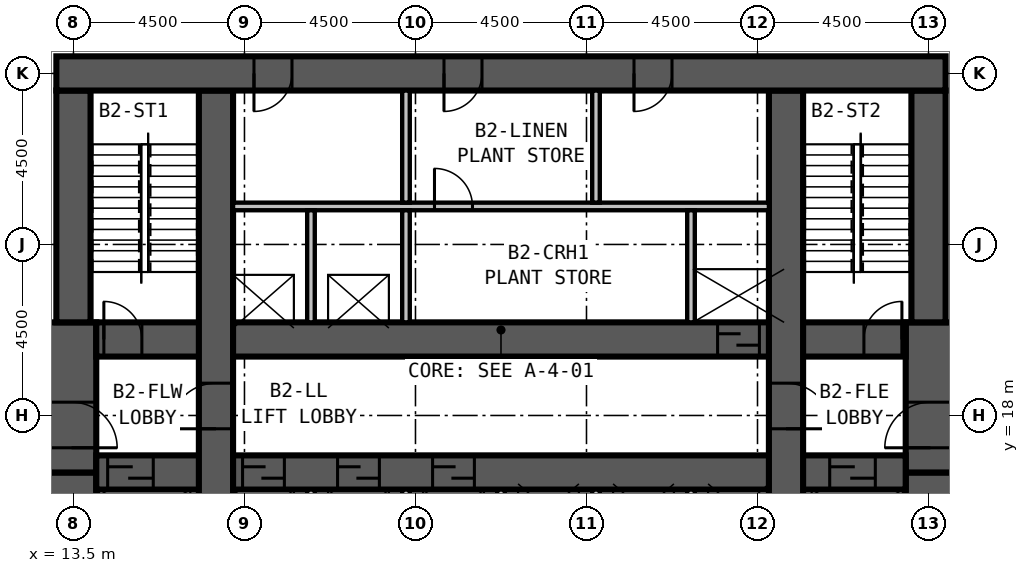
"""IFC4 building model, lengths in metres.
Left out: names, types, materials, properties, quantities, classifications, styles, units other than length and angle.
Written with IfcOpenShell. Run it as: python <this file> out.ifc"""

import sys

from ifc_helpers import new_model, si_unit, direction, frame, frame_2d, origin, place, context, subcontext, project, spatial, rectangle, extrude, element, fill, save


model = new_model("IFC4")
c1 = context("Model", 3, precision=1e-05, world=origin(), true_north=direction((0.0, 1.0)))
c2 = subcontext(c1, "Body", "Model", "MODEL_VIEW")
j1 = project(units=[si_unit("LENGTHUNIT", "METRE"), si_unit("PLANEANGLEUNIT", "RADIAN")], contexts=[c1])
p1 = place(None, origin())
s1 = spatial("IfcSite", under=j1, at=p1, CompositionType="ELEMENT")
p2 = place(p1, origin())
s2 = spatial("IfcBuilding", under=s1, at=p2, CompositionType="ELEMENT")
p3 = place(p2, frame((0.0, 0.0, -9.0)))
s3 = spatial("IfcBuildingStorey", under=s2, at=p3, CompositionType="ELEMENT", Elevation=-9.0)
p4 = place(p3, frame((36.45, 27.0, 0.0), z_axis=(0.0, 0.0, 1.0), x_axis=(-1.0, 0.0, 0.0)))
e1 = element("IfcWall", 1, at=p4, inside=s3, PredefinedType="SHEAR", context=c2, shape_type="SweptSolid", body=[
    extrude(rectangle(XDim=23.4, YDim=0.9, at=frame_2d((11.7, 0.0))), origin(), (0.0, 0.0, 1.0), 4.5),
])
p5 = place(p4, frame((17.2, 0.0, 0.0)))
e2 = element("IfcOpeningElement", 2, at=p5, cuts=e1, PredefinedType="OPENING", context=c2, shape_type="SweptSolid", body=[
    extrude(rectangle(XDim=1.0, YDim=2.1, at=frame_2d((0.5, 1.05))), frame((0.0, 0.46, 0.0), z_axis=(0.0, -1.0, 0.0), x_axis=(1.0, 0.0, 0.0)), (0.0, 0.0, 1.0), 0.92),
])
p6 = place(p4, frame((12.2, 0.0, 0.0)))
e3 = element("IfcOpeningElement", 3, at=p6, cuts=e1, PredefinedType="OPENING", context=c2, shape_type="SweptSolid", body=[
    extrude(rectangle(XDim=1.0, YDim=2.1, at=frame_2d((0.5, 1.05))), frame((0.0, 0.46, 0.0), z_axis=(0.0, -1.0, 0.0), x_axis=(1.0, 0.0, 0.0)), (0.0, 0.0, 1.0), 0.92),
])
p7 = place(p4, frame((7.2, 0.0, 0.0)))
e4 = element("IfcOpeningElement", 4, at=p7, cuts=e1, PredefinedType="OPENING", context=c2, shape_type="SweptSolid", body=[
    extrude(rectangle(XDim=1.0, YDim=2.1, at=frame_2d((0.5, 1.05))), frame((0.0, 0.46, 0.0), z_axis=(0.0, -1.0, 0.0), x_axis=(1.0, 0.0, 0.0)), (0.0, 0.0, 1.0), 0.92),
])
p8 = place(p3, frame((17.25, 13.95, 0.0), z_axis=(0.0, 0.0, 1.0), x_axis=(0.0, 1.0, 0.0)))
e5 = element("IfcWall", 5, at=p8, inside=s3, PredefinedType="SHEAR", context=c2, shape_type="SweptSolid", body=[
    extrude(rectangle(XDim=12.6, YDim=0.9, at=frame_2d((6.3, 0.0))), origin(), (0.0, 0.0, 1.0), 4.5),
])
p9 = place(p8, frame((3.7, 0.0, 0.0)))
e6 = element("IfcOpeningElement", 6, at=p9, cuts=e5, PredefinedType="OPENING", context=c2, shape_type="SweptSolid", body=[
    extrude(rectangle(XDim=1.2, YDim=2.1, at=frame_2d((0.6, 1.05))), frame((0.0, 0.46, 0.0), z_axis=(0.0, -1.0, 0.0), x_axis=(1.0, 0.0, 0.0)), (0.0, 0.0, 1.0), 0.92),
])
p10 = place(p3, frame((32.25, 13.95, 0.0), z_axis=(0.0, 0.0, 1.0), x_axis=(0.0, 1.0, 0.0)))
e7 = element("IfcWall", 7, at=p10, inside=s3, PredefinedType="SHEAR", context=c2, shape_type="SweptSolid", body=[
    extrude(rectangle(XDim=12.6, YDim=0.9, at=frame_2d((6.3, 0.0))), origin(), (0.0, 0.0, 1.0), 4.5),
])
p11 = place(p10, frame((4.9, 0.0, 0.0), z_axis=(0.0, 0.0, 1.0), x_axis=(-1.0, 0.0, 0.0)))
e8 = element("IfcOpeningElement", 8, at=p11, cuts=e7, PredefinedType="OPENING", context=c2, shape_type="SweptSolid", body=[
    extrude(rectangle(XDim=1.2, YDim=2.1, at=frame_2d((0.6, 1.05))), frame((0.0, 0.46, 0.0), z_axis=(0.0, -1.0, 0.0), x_axis=(1.0, 0.0, 0.0)), (0.0, 0.0, 1.0), 0.92),
])
p12 = place(p3, frame((14.1, 16.5, 0.0), z_axis=(0.0, 0.0, 1.0), x_axis=(1.0, 0.0, 0.0)))
e9 = element("IfcWall", 9, at=p12, inside=s3, PredefinedType="SHEAR", context=c2, shape_type="SweptSolid", body=[
    extrude(rectangle(XDim=21.3, YDim=0.9, at=frame_2d((10.65, 0.0))), origin(), (0.0, 0.0, 1.0), 4.5),
])
p13 = place(p12, frame((3.85, 0.0, 0.0)))
e10 = element("IfcOpeningElement", 10, at=p13, cuts=e9, PredefinedType="OPENING", context=c2, shape_type="SweptSolid", body=[
    extrude(rectangle(XDim=1.1, YDim=2.1, at=frame_2d((0.55, 1.05))), frame((0.0, 0.46, 0.0), z_axis=(0.0, -1.0, 0.0), x_axis=(1.0, 0.0, 0.0)), (0.0, 0.0, 1.0), 0.92),
])
p14 = place(p12, frame((6.35, 0.0, 0.0)))
e11 = element("IfcOpeningElement", 11, at=p14, cuts=e9, PredefinedType="OPENING", context=c2, shape_type="SweptSolid", body=[
    extrude(rectangle(XDim=1.1, YDim=2.1, at=frame_2d((0.55, 1.05))), frame((0.0, 0.46, 0.0), z_axis=(0.0, -1.0, 0.0), x_axis=(1.0, 0.0, 0.0)), (0.0, 0.0, 1.0), 0.92),
])
p15 = place(p12, frame((8.85, 0.0, 0.0)))
e12 = element("IfcOpeningElement", 12, at=p15, cuts=e9, PredefinedType="OPENING", context=c2, shape_type="SweptSolid", body=[
    extrude(rectangle(XDim=1.1, YDim=2.1, at=frame_2d((0.55, 1.05))), frame((0.0, 0.46, 0.0), z_axis=(0.0, -1.0, 0.0), x_axis=(1.0, 0.0, 0.0)), (0.0, 0.0, 1.0), 0.92),
])
p16 = place(p12, frame((0.3, 0.0, 0.0)))
e13 = element("IfcOpeningElement", 13, at=p16, cuts=e9, PredefinedType="OPENING", context=c2, shape_type="SweptSolid", body=[
    extrude(rectangle(XDim=1.2, YDim=2.1, at=frame_2d((0.6, 1.05))), frame((0.0, 0.46, 0.0), z_axis=(0.0, -1.0, 0.0), x_axis=(1.0, 0.0, 0.0)), (0.0, 0.0, 1.0), 0.92),
])
p17 = place(p12, frame((19.3, 0.0, 0.0)))
e14 = element("IfcOpeningElement", 14, at=p17, cuts=e9, PredefinedType="OPENING", context=c2, shape_type="SweptSolid", body=[
    extrude(rectangle(XDim=1.2, YDim=2.1, at=frame_2d((0.6, 1.05))), frame((0.0, 0.46, 0.0), z_axis=(0.0, -1.0, 0.0), x_axis=(1.0, 0.0, 0.0)), (0.0, 0.0, 1.0), 0.92),
])
p18 = place(p3, frame((14.1, 20.0, 0.0), z_axis=(0.0, 0.0, 1.0), x_axis=(1.0, 0.0, 0.0)))
e15 = element("IfcWall", 15, at=p18, inside=s3, PredefinedType="SHEAR", context=c2, shape_type="SweptSolid", body=[
    extrude(rectangle(XDim=21.3, YDim=0.9, at=frame_2d((10.65, 0.0))), origin(), (0.0, 0.0, 1.0), 4.5),
])
p19 = place(p18, frame((0.2, 0.0, 0.0)))
e16 = element("IfcOpeningElement", 16, at=p19, cuts=e15, PredefinedType="OPENING", context=c2, shape_type="SweptSolid", body=[
    extrude(rectangle(XDim=1.0, YDim=2.1, at=frame_2d((0.5, 1.05))), frame((0.0, 0.46, 0.0), z_axis=(0.0, -1.0, 0.0), x_axis=(1.0, 0.0, 0.0)), (0.0, 0.0, 1.0), 0.92),
])
p20 = place(p18, frame((20.2, 0.0, 0.0)))
e17 = element("IfcOpeningElement", 17, at=p20, cuts=e15, PredefinedType="OPENING", context=c2, shape_type="SweptSolid", body=[
    extrude(rectangle(XDim=1.0, YDim=2.1, at=frame_2d((0.5, 1.05))), frame((0.0, 0.46, 0.0), z_axis=(0.0, -1.0, 0.0), x_axis=(1.0, 0.0, 0.0)), (0.0, 0.0, 1.0), 0.92),
])
p21 = place(p18, frame((16.35, 0.0, 0.0)))
e18 = element("IfcOpeningElement", 18, at=p21, cuts=e15, PredefinedType="OPENING", context=c2, shape_type="SweptSolid", body=[
    extrude(rectangle(XDim=1.1, YDim=2.1, at=frame_2d((0.55, 1.05))), frame((0.0, 0.46, 0.0), z_axis=(0.0, -1.0, 0.0), x_axis=(1.0, 0.0, 0.0)), (0.0, 0.0, 1.0), 0.92),
])
p22 = place(p3, frame((13.5, 26.55, 0.0), z_axis=(0.0, 0.0, 1.0), x_axis=(0.0, -1.0, 0.0)))
e19 = element("IfcWall", 19, at=p22, inside=s3, PredefinedType="SHEAR", context=c2, shape_type="SweptSolid", body=[
    extrude(rectangle(XDim=6.1, YDim=0.9, at=frame_2d((3.05, 0.0))), origin(), (0.0, 0.0, 1.0), 4.5),
])
p23 = place(p3, frame((13.45, 20.45, 0.0), z_axis=(0.0, 0.0, 1.0), x_axis=(0.0, -1.0, 0.0)))
e20 = element("IfcWall", 20, at=p23, inside=s3, PredefinedType="SHEAR", context=c2, shape_type="SweptSolid", body=[
    extrude(rectangle(XDim=3.95, YDim=1.3, at=frame_2d((1.975, 0.0))), origin(), (0.0, 0.0, 1.0), 4.5),
])
p24 = place(p23, frame((2.1, 0.0, 0.0)))
e21 = element("IfcOpeningElement", 21, at=p24, cuts=e20, PredefinedType="OPENING", context=c2, shape_type="SweptSolid", body=[
    extrude(rectangle(XDim=1.2, YDim=2.1, at=frame_2d((0.6, 1.05))), frame((0.0, 0.66, 0.0), z_axis=(0.0, -1.0, 0.0), x_axis=(1.0, 0.0, 0.0)), (0.0, 0.0, 1.0), 1.32),
])
for number, where, z_axis, x_axis in (
    (22, (13.45, 16.5, 0.0), (0.0, 0.0, 1.0), (0.0, -1.0, 0.0)),
    (23, (36.05, 13.95, 0.0), (0.0, 0.0, 1.0), (0.0, 1.0, 0.0)),
):
    element("IfcWall", number, at=place(p3, frame(where, z_axis=z_axis, x_axis=x_axis)), inside=s3, PredefinedType="SHEAR", context=c2, shape_type="SweptSolid", body=[
        extrude(rectangle(XDim=2.55, YDim=1.3, at=frame_2d((1.275, 0.0))), origin(), (0.0, 0.0, 1.0), 4.5),
    ])
p25 = place(p3, frame((36.05, 16.5, 0.0), z_axis=(0.0, 0.0, 1.0), x_axis=(0.0, 1.0, 0.0)))
e24 = element("IfcWall", 24, at=p25, inside=s3, PredefinedType="SHEAR", context=c2, shape_type="SweptSolid", body=[
    extrude(rectangle(XDim=3.95, YDim=1.3, at=frame_2d((1.975, 0.0))), origin(), (0.0, 0.0, 1.0), 4.5),
])
p26 = place(p25, frame((0.65, 0.0, 0.0)))
e25 = element("IfcOpeningElement", 25, at=p26, cuts=e24, PredefinedType="OPENING", context=c2, shape_type="SweptSolid", body=[
    extrude(rectangle(XDim=1.2, YDim=2.1, at=frame_2d((0.6, 1.05))), frame((0.0, 0.66, 0.0), z_axis=(0.0, -1.0, 0.0), x_axis=(1.0, 0.0, 0.0)), (0.0, 0.0, 1.0), 1.32),
])
p27 = place(p3, frame((36.0, 20.45, 0.0), z_axis=(0.0, 0.0, 1.0), x_axis=(0.0, 1.0, 0.0)))
e26 = element("IfcWall", 26, at=p27, inside=s3, PredefinedType="SHEAR", context=c2, shape_type="SweptSolid", body=[
    extrude(rectangle(XDim=6.1, YDim=0.9, at=frame_2d((3.05, 0.0))), origin(), (0.0, 0.0, 1.0), 4.5),
])
p28 = place(p3, frame((19.75, 13.95, 0.0), z_axis=(0.0, 0.0, 1.0), x_axis=(0.0, 1.0, 0.0)))
e27 = element("IfcWall", 27, at=p28, inside=s3, PredefinedType="PARTITIONING", context=c2, shape_type="SweptSolid", body=[
    extrude(rectangle(XDim=2.1, YDim=0.2, at=frame_2d((1.05, 0.0))), origin(), (0.0, 0.0, 1.0), 4.25),
])
p29 = place(p3, frame((19.75, 20.45, 0.0), z_axis=(0.0, 0.0, 1.0), x_axis=(0.0, 1.0, 0.0)))
e28 = element("IfcWall", 28, at=p29, inside=s3, PredefinedType="PARTITIONING", context=c2, shape_type="SweptSolid", body=[
    extrude(rectangle(XDim=2.95, YDim=0.2, at=frame_2d((1.475, 0.0))), origin(), (0.0, 0.0, 1.0), 4.25),
])
p30 = place(p3, frame((22.25, 13.95, 0.0), z_axis=(0.0, 0.0, 1.0), x_axis=(0.0, 1.0, 0.0)))
e29 = element("IfcWall", 29, at=p30, inside=s3, PredefinedType="PARTITIONING", context=c2, shape_type="SweptSolid", body=[
    extrude(rectangle(XDim=2.1, YDim=0.2, at=frame_2d((1.05, 0.0))), origin(), (0.0, 0.0, 1.0), 4.25),
])
p31 = place(p3, frame((22.25, 20.45, 0.0), z_axis=(0.0, 0.0, 1.0), x_axis=(0.0, 1.0, 0.0)))
e30 = element("IfcWall", 30, at=p31, inside=s3, PredefinedType="PARTITIONING", context=c2, shape_type="SweptSolid", body=[
    extrude(rectangle(XDim=2.95, YDim=0.2, at=frame_2d((1.475, 0.0))), origin(), (0.0, 0.0, 1.0), 4.25),
])
for number, where, z_axis, x_axis in (
    (31, (24.75, 13.95, 0.0), (0.0, 0.0, 1.0), (0.0, 1.0, 0.0)),
    (32, (27.25, 13.95, 0.0), (0.0, 0.0, 1.0), (0.0, 1.0, 0.0)),
    (33, (29.75, 13.95, 0.0), (0.0, 0.0, 1.0), (0.0, 1.0, 0.0)),
):
    element("IfcWall", number, at=place(p3, frame(where, z_axis=z_axis, x_axis=x_axis)), inside=s3, PredefinedType="PARTITIONING", context=c2, shape_type="SweptSolid", body=[
        extrude(rectangle(XDim=2.1, YDim=0.2, at=frame_2d((1.05, 0.0))), origin(), (0.0, 0.0, 1.0), 4.25),
    ])
p32 = place(p3, frame((29.75, 20.45, 0.0), z_axis=(0.0, 0.0, 1.0), x_axis=(0.0, 1.0, 0.0)))
e34 = element("IfcWall", 34, at=p32, inside=s3, PredefinedType="PARTITIONING", context=c2, shape_type="SweptSolid", body=[
    extrude(rectangle(XDim=2.95, YDim=0.2, at=frame_2d((1.475, 0.0))), origin(), (0.0, 0.0, 1.0), 4.25),
])
p33 = place(p3, frame((17.7, 23.5, 0.0), z_axis=(0.0, 0.0, 1.0), x_axis=(1.0, 0.0, 0.0)))
e35 = element("IfcWall", 35, at=p33, inside=s3, PredefinedType="PARTITIONING", context=c2, shape_type="SweptSolid", body=[
    extrude(rectangle(XDim=14.1, YDim=0.2, at=frame_2d((7.05, 0.0))), origin(), (0.0, 0.0, 1.0), 4.25),
])
p34 = place(p33, frame((5.3, 0.0, 0.0)))
e36 = element("IfcOpeningElement", 36, at=p34, cuts=e35, PredefinedType="OPENING", context=c2, shape_type="SweptSolid", body=[
    extrude(rectangle(XDim=1.0, YDim=2.1, at=frame_2d((0.5, 1.05))), frame((0.0, 0.11, 0.0), z_axis=(0.0, -1.0, 0.0), x_axis=(1.0, 0.0, 0.0)), (0.0, 0.0, 1.0), 0.22),
])
for number, where, z_axis, x_axis in (
    (37, (22.25, 23.6, 0.0), (0.0, 0.0, 1.0), (0.0, 1.0, 0.0)),
    (38, (27.25, 23.6, 0.0), (0.0, 0.0, 1.0), (0.0, 1.0, 0.0)),
):
    element("IfcWall", number, at=place(p3, frame(where, z_axis=z_axis, x_axis=x_axis)), inside=s3, PredefinedType="PARTITIONING", context=c2, shape_type="SweptSolid", body=[
        extrude(rectangle(XDim=2.95, YDim=0.2, at=frame_2d((1.475, 0.0))), origin(), (0.0, 0.0, 1.0), 4.25),
    ])
p35 = place(p34, origin())
e39 = element("IfcDoor", 39, at=p35, inside=s3, OperationType="SINGLE_SWING_LEFT", PredefinedType="DOOR", context=c2, shape_type="SweptSolid", body=[
    extrude(rectangle(XDim=1.0, YDim=2.1, at=frame_2d((0.5, 1.05))), frame((0.0, 0.025, 0.0), z_axis=(0.0, -1.0, 0.0), x_axis=(1.0, 0.0, 0.0)), (0.0, 0.0, 1.0), 0.05),
])
fill(e36, e39)
p36 = place(p24, origin())
e40 = element("IfcDoor", 40, at=p36, inside=s3, OperationType="SINGLE_SWING_RIGHT", PredefinedType="DOOR", context=c2, shape_type="SweptSolid", body=[
    extrude(rectangle(XDim=1.2, YDim=2.1, at=frame_2d((0.6, 1.05))), frame((0.0, 0.575, 0.0), z_axis=(0.0, -1.0, 0.0), x_axis=(1.0, 0.0, 0.0)), (0.0, 0.0, 1.0), 1.15),
])
fill(e21, e40)
p37 = place(p26, origin())
e41 = element("IfcDoor", 41, at=p37, inside=s3, OperationType="SINGLE_SWING_LEFT", PredefinedType="DOOR", context=c2, shape_type="SweptSolid", body=[
    extrude(rectangle(XDim=1.2, YDim=2.1, at=frame_2d((0.6, 1.05))), frame((0.0, 0.575, 0.0), z_axis=(0.0, -1.0, 0.0), x_axis=(1.0, 0.0, 0.0)), (0.0, 0.0, 1.0), 1.15),
])
fill(e25, e41)
p38 = place(p9, origin())
e42 = element("IfcDoor", 42, at=p38, inside=s3, OperationType="SINGLE_SWING_LEFT", PredefinedType="DOOR", context=c2, shape_type="SweptSolid", body=[
    extrude(rectangle(XDim=1.2, YDim=2.1, at=frame_2d((0.6, 1.05))), frame((0.0, 0.45, 0.0), z_axis=(0.0, -1.0, 0.0), x_axis=(1.0, 0.0, 0.0)), (0.0, 0.0, 1.0), 0.899),
])
fill(e6, e42)
p39 = place(p11, origin())
e43 = element("IfcDoor", 43, at=p39, inside=s3, OperationType="SINGLE_SWING_RIGHT", PredefinedType="DOOR", context=c2, shape_type="SweptSolid", body=[
    extrude(rectangle(XDim=1.2, YDim=2.1, at=frame_2d((0.6, 1.05))), frame((0.0, 0.45, 0.0), z_axis=(0.0, -1.0, 0.0), x_axis=(1.0, 0.0, 0.0)), (0.0, 0.0, 1.0), 0.899),
])
fill(e8, e43)
p40 = place(p19, origin())
e44 = element("IfcDoor", 44, at=p40, inside=s3, OperationType="SINGLE_SWING_LEFT", PredefinedType="DOOR", context=c2, shape_type="SweptSolid", body=[
    extrude(rectangle(XDim=1.0, YDim=2.1, at=frame_2d((0.5, 1.05))), frame((0.0, 0.45, 0.0), z_axis=(0.0, -1.0, 0.0), x_axis=(1.0, 0.0, 0.0)), (0.0, 0.0, 1.0), 0.899),
])
fill(e16, e44)
p41 = place(p20, origin())
e45 = element("IfcDoor", 45, at=p41, inside=s3, OperationType="SINGLE_SWING_RIGHT", PredefinedType="DOOR", context=c2, shape_type="SweptSolid", body=[
    extrude(rectangle(XDim=1.0, YDim=2.1, at=frame_2d((0.5, 1.05))), frame((0.0, 0.45, 0.0), z_axis=(0.0, -1.0, 0.0), x_axis=(1.0, 0.0, 0.0)), (0.0, 0.0, 1.0), 0.899),
])
fill(e17, e45)
p42 = place(p13, origin())
e46 = element("IfcDoor", 46, at=p42, inside=s3, OperationType="SLIDING_TO_LEFT", PredefinedType="DOOR", context=c2, shape_type="SweptSolid", body=[
    extrude(rectangle(XDim=1.1, YDim=2.1, at=frame_2d((0.55, 1.05))), frame((0.0, 0.45, 0.0), z_axis=(0.0, -1.0, 0.0), x_axis=(1.0, 0.0, 0.0)), (0.0, 0.0, 1.0), 0.899),
])
fill(e10, e46)
p43 = place(p14, origin())
e47 = element("IfcDoor", 47, at=p43, inside=s3, OperationType="SLIDING_TO_LEFT", PredefinedType="DOOR", context=c2, shape_type="SweptSolid", body=[
    extrude(rectangle(XDim=1.1, YDim=2.1, at=frame_2d((0.55, 1.05))), frame((0.0, 0.45, 0.0), z_axis=(0.0, -1.0, 0.0), x_axis=(1.0, 0.0, 0.0)), (0.0, 0.0, 1.0), 0.899),
])
fill(e11, e47)
p44 = place(p15, origin())
e48 = element("IfcDoor", 48, at=p44, inside=s3, OperationType="SLIDING_TO_LEFT", PredefinedType="DOOR", context=c2, shape_type="SweptSolid", body=[
    extrude(rectangle(XDim=1.1, YDim=2.1, at=frame_2d((0.55, 1.05))), frame((0.0, 0.45, 0.0), z_axis=(0.0, -1.0, 0.0), x_axis=(1.0, 0.0, 0.0)), (0.0, 0.0, 1.0), 0.899),
])
fill(e12, e48)
p45 = place(p21, origin())
e49 = element("IfcDoor", 49, at=p45, inside=s3, OperationType="SLIDING_TO_LEFT", PredefinedType="DOOR", context=c2, shape_type="SweptSolid", body=[
    extrude(rectangle(XDim=1.1, YDim=2.1, at=frame_2d((0.55, 1.05))), frame((0.0, 0.45, 0.0), z_axis=(0.0, -1.0, 0.0), x_axis=(1.0, 0.0, 0.0)), (0.0, 0.0, 1.0), 0.899),
])
fill(e18, e49)
p46 = place(p16, origin())
e50 = element("IfcDoor", 50, at=p46, inside=s3, OperationType="SLIDING_TO_LEFT", PredefinedType="DOOR", context=c2, shape_type="SweptSolid", body=[
    extrude(rectangle(XDim=1.2, YDim=2.1, at=frame_2d((0.6, 1.05))), frame((0.0, 0.45, 0.0), z_axis=(0.0, -1.0, 0.0), x_axis=(1.0, 0.0, 0.0)), (0.0, 0.0, 1.0), 0.899),
])
fill(e13, e50)
p47 = place(p17, origin())
e51 = element("IfcDoor", 51, at=p47, inside=s3, OperationType="SLIDING_TO_LEFT", PredefinedType="DOOR", context=c2, shape_type="SweptSolid", body=[
    extrude(rectangle(XDim=1.2, YDim=2.1, at=frame_2d((0.6, 1.05))), frame((0.0, 0.45, 0.0), z_axis=(0.0, -1.0, 0.0), x_axis=(1.0, 0.0, 0.0)), (0.0, 0.0, 1.0), 0.899),
])
fill(e14, e51)
p48 = place(p5, origin())
e52 = element("IfcDoor", 52, at=p48, inside=s3, OperationType="SINGLE_SWING_RIGHT", PredefinedType="DOOR", context=c2, shape_type="SweptSolid", body=[
    extrude(rectangle(XDim=1.0, YDim=2.1, at=frame_2d((0.5, 1.05))), frame((0.0, 0.45, 0.0), z_axis=(0.0, -1.0, 0.0), x_axis=(1.0, 0.0, 0.0)), (0.0, 0.0, 1.0), 0.899),
])
fill(e2, e52)
p49 = place(p6, origin())
e53 = element("IfcDoor", 53, at=p49, inside=s3, OperationType="SINGLE_SWING_RIGHT", PredefinedType="DOOR", context=c2, shape_type="SweptSolid", body=[
    extrude(rectangle(XDim=1.0, YDim=2.1, at=frame_2d((0.5, 1.05))), frame((0.0, 0.45, 0.0), z_axis=(0.0, -1.0, 0.0), x_axis=(1.0, 0.0, 0.0)), (0.0, 0.0, 1.0), 0.899),
])
fill(e3, e53)
p50 = place(p7, origin())
e54 = element("IfcDoor", 54, at=p50, inside=s3, OperationType="SINGLE_SWING_RIGHT", PredefinedType="DOOR", context=c2, shape_type="SweptSolid", body=[
    extrude(rectangle(XDim=1.0, YDim=2.1, at=frame_2d((0.5, 1.05))), frame((0.0, 0.45, 0.0), z_axis=(0.0, -1.0, 0.0), x_axis=(1.0, 0.0, 0.0)), (0.0, 0.0, 1.0), 0.899),
])
fill(e4, e54)
save(model, sys.argv[1])
